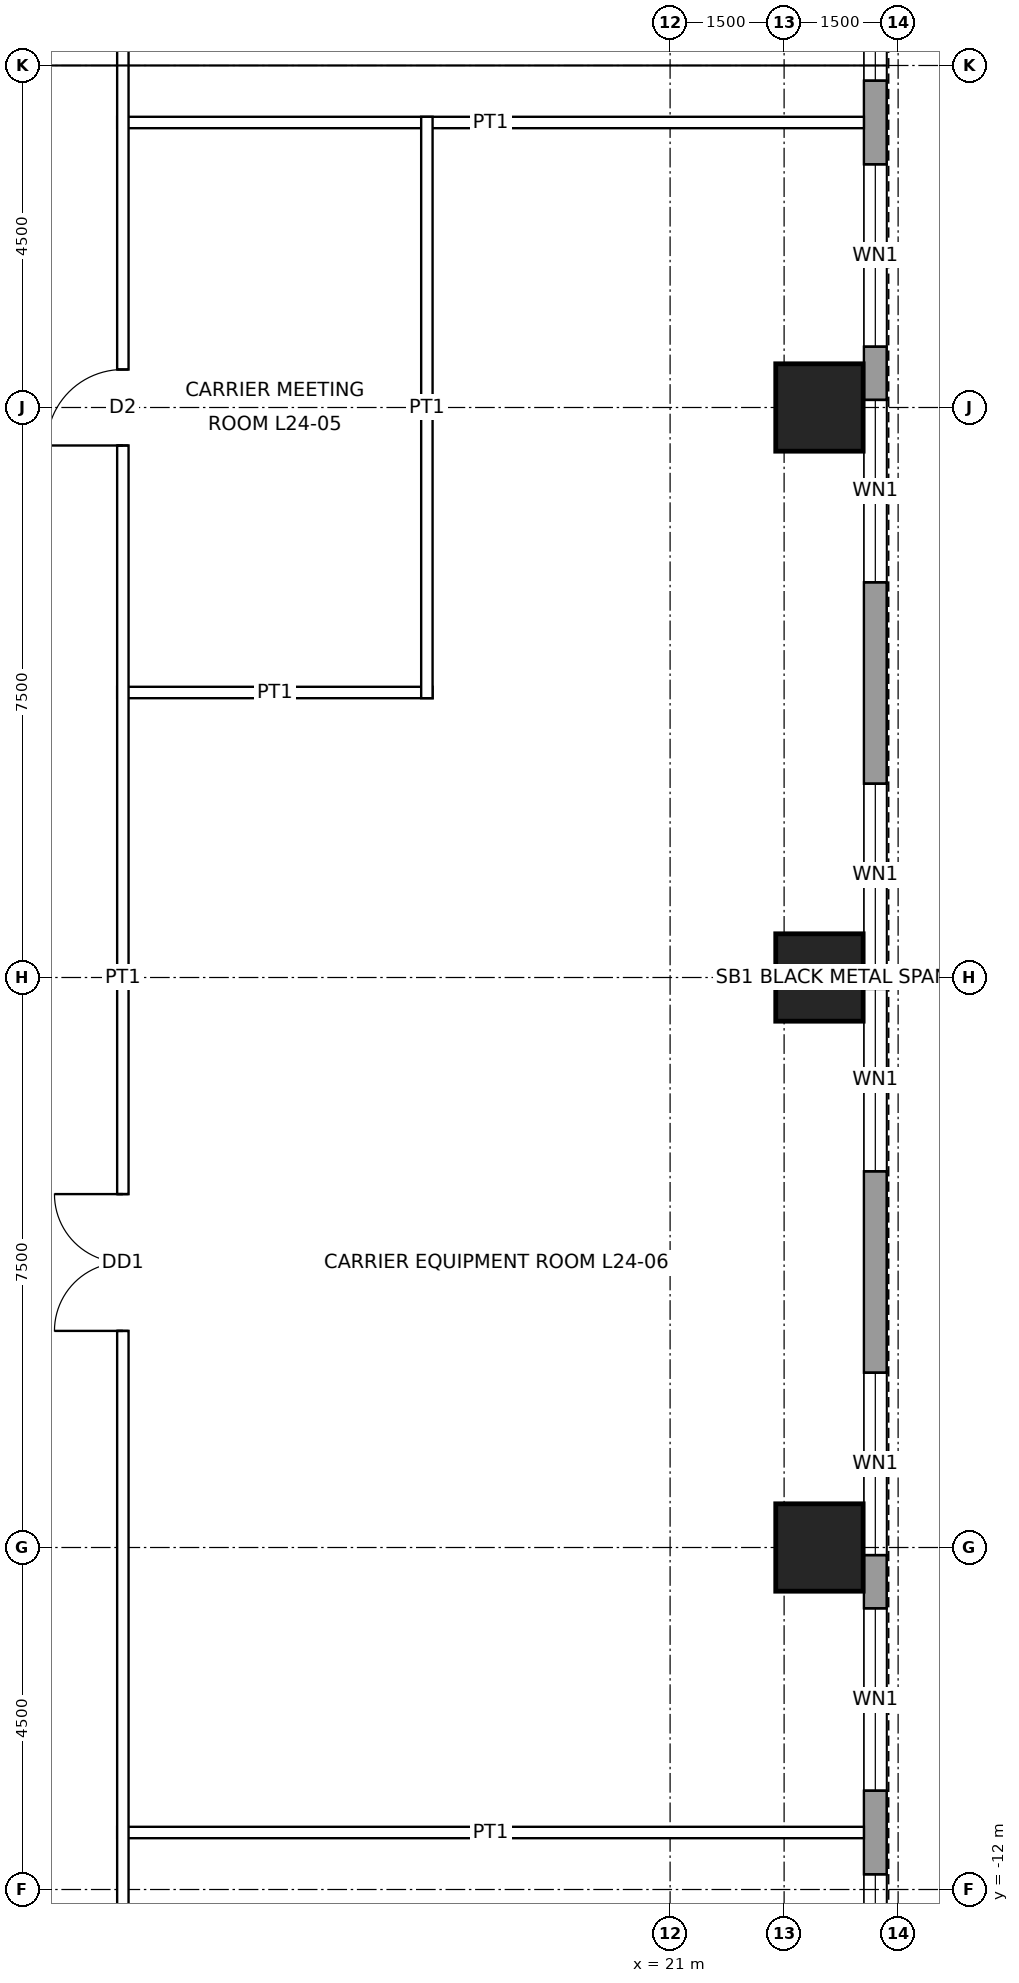
"""IFC4 building model, lengths in metres.
Left out: names, types, materials, properties, quantities, classifications, styles, units other than length and angle.
Written with IfcOpenShell. Run it as: python <this file> out.ifc"""

import sys

from ifc_helpers import new_model, si_unit, direction, frame, frame_2d, origin, origin_2d, place, context, subcontext, project, spatial, rectangle, hollow_rectangle, extrude, element, fill, save


model = new_model("IFC4")
c1 = context("Model", 3, precision=1e-05, world=origin(), true_north=direction((0.0, 1.0)))
c2 = subcontext(c1, "Body", "Model", "MODEL_VIEW")
j1 = project(units=[si_unit("LENGTHUNIT", "METRE"), si_unit("PLANEANGLEUNIT", "RADIAN")], contexts=[c1])
p1 = place(None, origin())
s1 = spatial("IfcSite", under=j1, at=p1, CompositionType="ELEMENT")
p2 = place(p1, origin())
s2 = spatial("IfcBuilding", under=s1, at=p2, CompositionType="ELEMENT")
p3 = place(p2, frame((0.0, 0.0, 122.4)))
s3 = spatial("IfcBuildingStorey", under=s2, at=p3, CompositionType="ELEMENT", Elevation=122.4)
for number, where, z_axis, x_axis in (
    (1, (22.965, 7.5, 0.0), (0.0, 0.0, 1.0), (1.0, 0.0, 0.0)),
    (2, (22.965, 0.0, 0.0), (0.0, 0.0, 1.0), (1.0, 0.0, 0.0)),
    (3, (22.965, -7.5, 0.0), (0.0, 0.0, 1.0), (1.0, 0.0, 0.0)),
):
    element("IfcColumn", number, at=place(p3, frame(where, z_axis=z_axis, x_axis=x_axis)), inside=s3, PredefinedType="COLUMN", context=c2, shape_type="SweptSolid", body=[
        extrude(hollow_rectangle(XDim=1.15, YDim=1.15, WallThickness=0.075, at=origin_2d()), origin(), (0.0, 0.0, 1.0), 4.5),
    ])
p4 = place(p3, frame((23.7, 16.2, 0.0), z_axis=(0.0, 0.0, 1.0), x_axis=(0.0, -1.0, 0.0)))
e4 = element("IfcWall", 4, at=p4, inside=s3, PredefinedType="SOLIDWALL", context=c2, shape_type="SweptSolid", body=[
    extrude(rectangle(XDim=32.4, YDim=0.3, at=frame_2d((16.2, 0.0))), origin(), (0.0, 0.0, 1.0), 4.3),
])
p5 = place(p4, frame((2.0, 0.0, 1.0)))
e5 = element("IfcOpeningElement", 5, at=p5, cuts=e4, PredefinedType="OPENING", context=c2, shape_type="SweptSolid", body=[
    extrude(rectangle(XDim=2.4, YDim=1.2, at=frame_2d((1.2, 0.6))), frame((0.0, 0.16, 0.0), z_axis=(0.0, -1.0, 0.0), x_axis=(1.0, 0.0, 0.0)), (0.0, 0.0, 1.0), 0.32),
])
p6 = place(p4, frame((5.5, 0.0, 1.0)))
e6 = element("IfcOpeningElement", 6, at=p6, cuts=e4, PredefinedType="OPENING", context=c2, shape_type="SweptSolid", body=[
    extrude(rectangle(XDim=2.4, YDim=1.2, at=frame_2d((1.2, 0.6))), frame((0.0, 0.16, 0.0), z_axis=(0.0, -1.0, 0.0), x_axis=(1.0, 0.0, 0.0)), (0.0, 0.0, 1.0), 0.32),
])
p7 = place(p4, frame((8.6, 0.0, 1.0)))
e7 = element("IfcOpeningElement", 7, at=p7, cuts=e4, PredefinedType="OPENING", context=c2, shape_type="SweptSolid", body=[
    extrude(rectangle(XDim=2.4, YDim=1.2, at=frame_2d((1.2, 0.6))), frame((0.0, 0.16, 0.0), z_axis=(0.0, -1.0, 0.0), x_axis=(1.0, 0.0, 0.0)), (0.0, 0.0, 1.0), 0.32),
])
p8 = place(p4, frame((13.65, 0.0, 1.0)))
e8 = element("IfcOpeningElement", 8, at=p8, cuts=e4, PredefinedType="OPENING", context=c2, shape_type="SweptSolid", body=[
    extrude(rectangle(XDim=2.4, YDim=1.2, at=frame_2d((1.2, 0.6))), frame((0.0, 0.16, 0.0), z_axis=(0.0, -1.0, 0.0), x_axis=(1.0, 0.0, 0.0)), (0.0, 0.0, 1.0), 0.32),
])
p9 = place(p4, frame((16.35, 0.0, 1.0)))
e9 = element("IfcOpeningElement", 9, at=p9, cuts=e4, PredefinedType="OPENING", context=c2, shape_type="SweptSolid", body=[
    extrude(rectangle(XDim=2.4, YDim=1.2, at=frame_2d((1.2, 0.6))), frame((0.0, 0.16, 0.0), z_axis=(0.0, -1.0, 0.0), x_axis=(1.0, 0.0, 0.0)), (0.0, 0.0, 1.0), 0.32),
])
p10 = place(p4, frame((21.4, 0.0, 1.0)))
e10 = element("IfcOpeningElement", 10, at=p10, cuts=e4, PredefinedType="OPENING", context=c2, shape_type="SweptSolid", body=[
    extrude(rectangle(XDim=2.4, YDim=1.2, at=frame_2d((1.2, 0.6))), frame((0.0, 0.16, 0.0), z_axis=(0.0, -1.0, 0.0), x_axis=(1.0, 0.0, 0.0)), (0.0, 0.0, 1.0), 0.32),
])
p11 = place(p4, frame((24.5, 0.0, 1.0)))
e11 = element("IfcOpeningElement", 11, at=p11, cuts=e4, PredefinedType="OPENING", context=c2, shape_type="SweptSolid", body=[
    extrude(rectangle(XDim=2.4, YDim=1.2, at=frame_2d((1.2, 0.6))), frame((0.0, 0.16, 0.0), z_axis=(0.0, -1.0, 0.0), x_axis=(1.0, 0.0, 0.0)), (0.0, 0.0, 1.0), 0.32),
])
p12 = place(p4, frame((28.0, 0.0, 1.0)))
e12 = element("IfcOpeningElement", 12, at=p12, cuts=e4, PredefinedType="OPENING", context=c2, shape_type="SweptSolid", body=[
    extrude(rectangle(XDim=2.4, YDim=1.2, at=frame_2d((1.2, 0.6))), frame((0.0, 0.16, 0.0), z_axis=(0.0, -1.0, 0.0), x_axis=(1.0, 0.0, 0.0)), (0.0, 0.0, 1.0), 0.32),
])
p13 = place(p3, frame((13.725, -11.25, 0.0), z_axis=(0.0, 0.0, 1.0), x_axis=(1.0, 0.0, 0.0)))
e13 = element("IfcWall", 13, at=p13, inside=s3, PredefinedType="PARTITIONING", context=c2, shape_type="SweptSolid", body=[
    extrude(rectangle(XDim=9.825, YDim=0.15, at=frame_2d((4.913, 0.0))), origin(), (0.0, 0.0, 1.0), 3.431),
])
p14 = place(p3, frame((13.725, 3.75, 0.0), z_axis=(0.0, 0.0, 1.0), x_axis=(1.0, 0.0, 0.0)))
e14 = element("IfcWall", 14, at=p14, inside=s3, PredefinedType="PARTITIONING", context=c2, shape_type="SweptSolid", body=[
    extrude(rectangle(XDim=4.15, YDim=0.15, at=frame_2d((2.075, 0.0))), origin(), (0.0, 0.0, 1.0), 3.431),
])
p15 = place(p3, frame((13.725, 11.25, 0.0), z_axis=(0.0, 0.0, 1.0), x_axis=(1.0, 0.0, 0.0)))
e15 = element("IfcWall", 15, at=p15, inside=s3, PredefinedType="PARTITIONING", context=c2, shape_type="SweptSolid", body=[
    extrude(rectangle(XDim=9.825, YDim=0.15, at=frame_2d((4.913, 0.0))), origin(), (0.0, 0.0, 1.0), 3.431),
])
p16 = place(p3, frame((13.8, -13.875, 0.0), z_axis=(0.0, 0.0, 1.0), x_axis=(0.0, 1.0, 0.0)))
e16 = element("IfcWall", 16, at=p16, inside=s3, PredefinedType="PARTITIONING", context=c2, shape_type="SweptSolid", body=[
    extrude(rectangle(XDim=27.75, YDim=0.15, at=frame_2d((13.875, 0.0))), origin(), (0.0, 0.0, 1.0), 4.3),
])
p17 = place(p16, frame((20.875, 0.0, 0.0)))
e17 = element("IfcOpeningElement", 17, at=p17, cuts=e16, PredefinedType="OPENING", context=c2, shape_type="SweptSolid", body=[
    extrude(rectangle(XDim=1.0, YDim=2.1, at=frame_2d((0.5, 1.05))), frame((0.0, 0.085, 0.0), z_axis=(0.0, -1.0, 0.0), x_axis=(1.0, 0.0, 0.0)), (0.0, 0.0, 1.0), 0.17),
])
p18 = place(p16, frame((9.225, 0.0, 0.0)))
e18 = element("IfcOpeningElement", 18, at=p18, cuts=e16, PredefinedType="OPENING", context=c2, shape_type="SweptSolid", body=[
    extrude(rectangle(XDim=1.8, YDim=2.4, at=frame_2d((0.9, 1.2))), frame((0.0, 0.085, 0.0), z_axis=(0.0, -1.0, 0.0), x_axis=(1.0, 0.0, 0.0)), (0.0, 0.0, 1.0), 0.17),
])
p19 = place(p3, frame((17.8, 3.675, 0.0), z_axis=(0.0, 0.0, 1.0), x_axis=(0.0, 1.0, 0.0)))
e19 = element("IfcWall", 19, at=p19, inside=s3, PredefinedType="PARTITIONING", context=c2, shape_type="SweptSolid", body=[
    extrude(rectangle(XDim=7.65, YDim=0.15, at=frame_2d((3.825, 0.0))), origin(), (0.0, 0.0, 1.0), 4.3),
])
p20 = place(p5, origin())
e20 = element("IfcWindow", 20, at=p20, inside=s3, PartitioningType="SINGLE_PANEL", PredefinedType="WINDOW", context=c2, shape_type="SweptSolid", body=[
    extrude(rectangle(XDim=2.4, YDim=1.2, at=frame_2d((1.2, 0.6))), frame((0.0, 0.03, 0.0), z_axis=(0.0, -1.0, 0.0), x_axis=(1.0, 0.0, 0.0)), (0.0, 0.0, 1.0), 0.06),
])
fill(e5, e20)
p21 = place(p6, origin())
e21 = element("IfcWindow", 21, at=p21, inside=s3, PartitioningType="SINGLE_PANEL", PredefinedType="WINDOW", context=c2, shape_type="SweptSolid", body=[
    extrude(rectangle(XDim=2.4, YDim=1.2, at=frame_2d((1.2, 0.6))), frame((0.0, 0.03, 0.0), z_axis=(0.0, -1.0, 0.0), x_axis=(1.0, 0.0, 0.0)), (0.0, 0.0, 1.0), 0.06),
])
fill(e6, e21)
p22 = place(p7, origin())
e22 = element("IfcWindow", 22, at=p22, inside=s3, PartitioningType="SINGLE_PANEL", PredefinedType="WINDOW", context=c2, shape_type="SweptSolid", body=[
    extrude(rectangle(XDim=2.4, YDim=1.2, at=frame_2d((1.2, 0.6))), frame((0.0, 0.03, 0.0), z_axis=(0.0, -1.0, 0.0), x_axis=(1.0, 0.0, 0.0)), (0.0, 0.0, 1.0), 0.06),
])
fill(e7, e22)
p23 = place(p8, origin())
e23 = element("IfcWindow", 23, at=p23, inside=s3, PartitioningType="SINGLE_PANEL", PredefinedType="WINDOW", context=c2, shape_type="SweptSolid", body=[
    extrude(rectangle(XDim=2.4, YDim=1.2, at=frame_2d((1.2, 0.6))), frame((0.0, 0.03, 0.0), z_axis=(0.0, -1.0, 0.0), x_axis=(1.0, 0.0, 0.0)), (0.0, 0.0, 1.0), 0.06),
])
fill(e8, e23)
p24 = place(p9, origin())
e24 = element("IfcWindow", 24, at=p24, inside=s3, PartitioningType="SINGLE_PANEL", PredefinedType="WINDOW", context=c2, shape_type="SweptSolid", body=[
    extrude(rectangle(XDim=2.4, YDim=1.2, at=frame_2d((1.2, 0.6))), frame((0.0, 0.03, 0.0), z_axis=(0.0, -1.0, 0.0), x_axis=(1.0, 0.0, 0.0)), (0.0, 0.0, 1.0), 0.06),
])
fill(e9, e24)
p25 = place(p10, origin())
e25 = element("IfcWindow", 25, at=p25, inside=s3, PartitioningType="SINGLE_PANEL", PredefinedType="WINDOW", context=c2, shape_type="SweptSolid", body=[
    extrude(rectangle(XDim=2.4, YDim=1.2, at=frame_2d((1.2, 0.6))), frame((0.0, 0.03, 0.0), z_axis=(0.0, -1.0, 0.0), x_axis=(1.0, 0.0, 0.0)), (0.0, 0.0, 1.0), 0.06),
])
fill(e10, e25)
p26 = place(p11, origin())
e26 = element("IfcWindow", 26, at=p26, inside=s3, PartitioningType="SINGLE_PANEL", PredefinedType="WINDOW", context=c2, shape_type="SweptSolid", body=[
    extrude(rectangle(XDim=2.4, YDim=1.2, at=frame_2d((1.2, 0.6))), frame((0.0, 0.03, 0.0), z_axis=(0.0, -1.0, 0.0), x_axis=(1.0, 0.0, 0.0)), (0.0, 0.0, 1.0), 0.06),
])
fill(e11, e26)
p27 = place(p12, origin())
e27 = element("IfcWindow", 27, at=p27, inside=s3, PartitioningType="SINGLE_PANEL", PredefinedType="WINDOW", context=c2, shape_type="SweptSolid", body=[
    extrude(rectangle(XDim=2.4, YDim=1.2, at=frame_2d((1.2, 0.6))), frame((0.0, 0.03, 0.0), z_axis=(0.0, -1.0, 0.0), x_axis=(1.0, 0.0, 0.0)), (0.0, 0.0, 1.0), 0.06),
])
fill(e12, e27)
p28 = place(p17, origin())
e28 = element("IfcDoor", 28, at=p28, inside=s3, OperationType="SINGLE_SWING_LEFT", PredefinedType="DOOR", context=c2, shape_type="SweptSolid", body=[
    extrude(rectangle(XDim=1.0, YDim=2.1, at=frame_2d((0.5, 1.05))), frame((0.0, 0.025, 0.0), z_axis=(0.0, -1.0, 0.0), x_axis=(1.0, 0.0, 0.0)), (0.0, 0.0, 1.0), 0.05),
])
fill(e17, e28)
p29 = place(p18, origin())
e29 = element("IfcDoor", 29, at=p29, inside=s3, OperationType="DOUBLE_DOOR_SINGLE_SWING", PredefinedType="DOOR", context=c2, shape_type="SweptSolid", body=[
    extrude(rectangle(XDim=1.8, YDim=2.4, at=frame_2d((0.9, 1.2))), frame((0.0, 0.025, 0.0), z_axis=(0.0, -1.0, 0.0), x_axis=(1.0, 0.0, 0.0)), (0.0, 0.0, 1.0), 0.05),
])
fill(e18, e29)
save(model, sys.argv[1])
